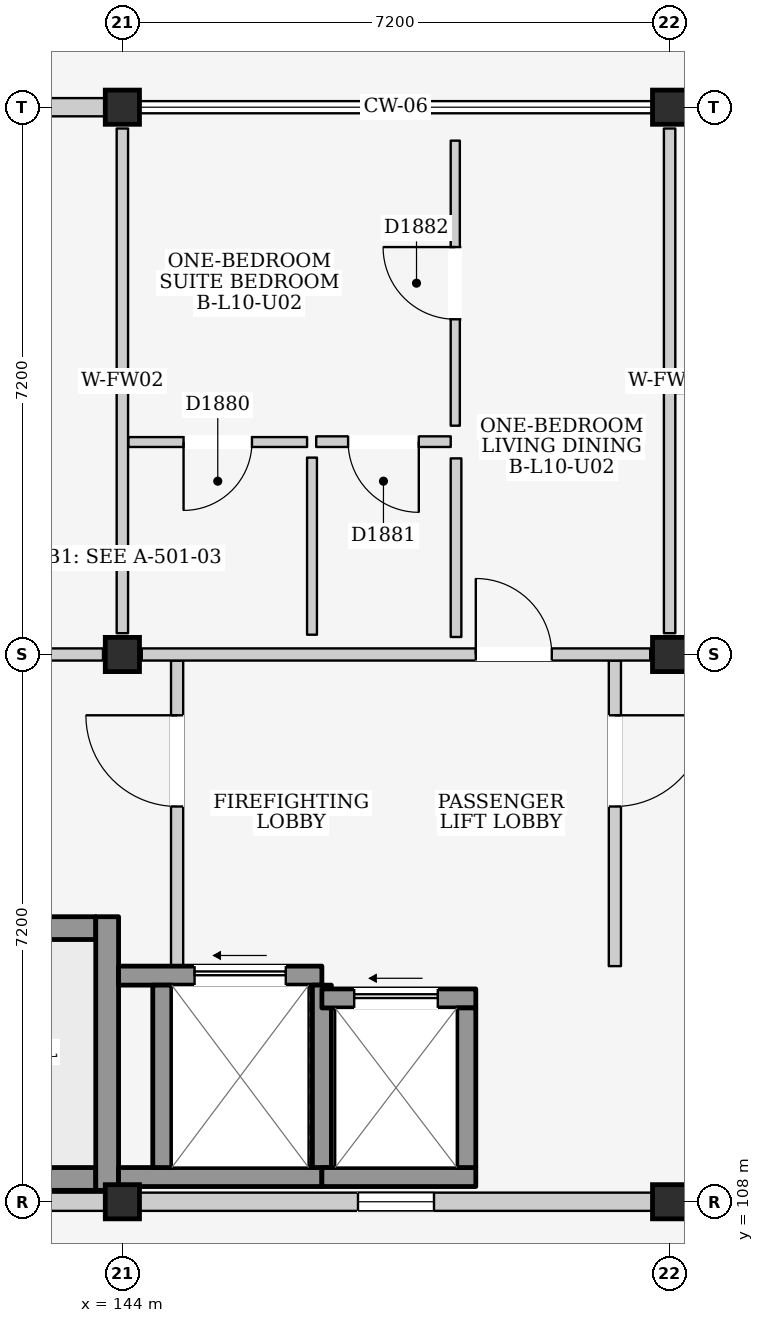
"""IFC4 building model, lengths in metres.
Left out: names, types, materials, properties, quantities, classifications, styles, units other than length and angle.
Written with IfcOpenShell. Run it as: python <this file> out.ifc"""

import sys

from ifc_helpers import new_model, si_unit, direction, frame, frame_2d, origin, origin_2d, place, context, subcontext, project, spatial, rectangle, extrude, element, fill, save


model = new_model("IFC4")
c1 = context("Model", 3, precision=1e-05, world=origin(), true_north=direction((0.0, 1.0)))
c2 = subcontext(c1, "Body", "Model", "MODEL_VIEW")
j1 = project(units=[si_unit("LENGTHUNIT", "METRE"), si_unit("PLANEANGLEUNIT", "RADIAN")], contexts=[c1])
p1 = place(None, origin())
s1 = spatial("IfcSite", under=j1, at=p1, CompositionType="ELEMENT")
p2 = place(p1, origin())
s2 = spatial("IfcBuilding", under=s1, at=p2, CompositionType="ELEMENT")
p3 = place(p2, frame((0.0, 0.0, 34.8)))
s3 = spatial("IfcBuildingStorey", under=s2, at=p3, CompositionType="ELEMENT", Elevation=34.8)
for number, where, z_axis, x_axis in (
    (1, (144.0, 108.0, 0.0), (0.0, 0.0, 1.0), (1.0, 0.0, 0.0)),
    (2, (144.0, 115.2, 0.0), (0.0, 0.0, 1.0), (1.0, 0.0, 0.0)),
    (3, (144.0, 122.4, 0.0), (0.0, 0.0, 1.0), (1.0, 0.0, 0.0)),
    (4, (151.2, 108.0, 0.0), (0.0, 0.0, 1.0), (1.0, 0.0, 0.0)),
    (5, (151.2, 115.2, 0.0), (0.0, 0.0, 1.0), (1.0, 0.0, 0.0)),
    (6, (151.2, 122.4, 0.0), (0.0, 0.0, 1.0), (1.0, 0.0, 0.0)),
):
    element("IfcColumn", number, at=place(p3, frame(where, z_axis=z_axis, x_axis=x_axis)), inside=s3, PredefinedType="COLUMN", context=c2, shape_type="SweptSolid", body=[
        extrude(rectangle(XDim=0.45, YDim=0.45, at=origin_2d()), origin(), (0.0, 0.0, 1.0), 3.2),
    ])
p4 = place(p3, frame((137.025, 108.0, 0.0), z_axis=(0.0, 0.0, 1.0), x_axis=(1.0, 0.0, 0.0)))
e7 = element("IfcWall", 7, at=p4, inside=s3, PredefinedType="ELEMENTEDWALL", context=c2, shape_type="SweptSolid", body=[
    extrude(rectangle(XDim=6.75, YDim=0.24, at=frame_2d((3.375, 0.0))), origin(), (0.0, 0.0, 1.0), 2.345),
])
p5 = place(p4, frame((2.875, 0.0, 1.2)))
e8 = element("IfcOpeningElement", 8, at=p5, cuts=e7, PredefinedType="OPENING", context=c2, shape_type="SweptSolid", body=[
    extrude(rectangle(XDim=1.0, YDim=0.9, at=frame_2d((0.5, 0.45))), frame((0.0, 0.135, 0.0), z_axis=(0.0, -1.0, 0.0), x_axis=(1.0, 0.0, 0.0)), (0.0, 0.0, 1.0), 0.27),
])
p6 = place(p3, frame((137.025, 122.4, 0.0), z_axis=(0.0, 0.0, 1.0), x_axis=(1.0, 0.0, 0.0)))
e9 = element("IfcWall", 9, at=p6, inside=s3, PredefinedType="ELEMENTEDWALL", context=c2, shape_type="SweptSolid", body=[
    extrude(rectangle(XDim=6.75, YDim=0.24, at=frame_2d((3.375, 0.0))), origin(), (0.0, 0.0, 1.0), 2.495),
])
p7 = place(p6, frame((3.85, 0.0, 0.0)))
e10 = element("IfcOpeningElement", 10, at=p7, cuts=e9, PredefinedType="OPENING", context=c2, shape_type="SweptSolid", body=[
    extrude(rectangle(XDim=1.8, YDim=2.12, at=frame_2d((0.9, 1.06))), frame((0.0, 0.135, 0.0), z_axis=(0.0, -1.0, 0.0), x_axis=(1.0, 0.0, 0.0)), (0.0, 0.0, 1.0), 0.27),
])
p8 = place(p6, frame((0.55, 0.0, 0.835)))
e11 = element("IfcOpeningElement", 11, at=p8, cuts=e9, PredefinedType="OPENING", context=c2, shape_type="SweptSolid", body=[
    extrude(rectangle(XDim=1.95, YDim=1.55, at=frame_2d((0.975, 0.775))), frame((0.0, 0.135, 0.0), z_axis=(0.0, -1.0, 0.0), x_axis=(1.0, 0.0, 0.0)), (0.0, 0.0, 1.0), 0.27),
])
p9 = place(p3, frame((144.225, 108.0, 0.0), z_axis=(0.0, 0.0, 1.0), x_axis=(1.0, 0.0, 0.0)))
e12 = element("IfcWall", 12, at=p9, inside=s3, PredefinedType="ELEMENTEDWALL", context=c2, shape_type="SweptSolid", body=[
    extrude(rectangle(XDim=6.75, YDim=0.24, at=frame_2d((3.375, 0.0))), origin(), (0.0, 0.0, 1.0), 2.345),
])
p10 = place(p9, frame((2.875, 0.0, 1.2)))
e13 = element("IfcOpeningElement", 13, at=p10, cuts=e12, PredefinedType="OPENING", context=c2, shape_type="SweptSolid", body=[
    extrude(rectangle(XDim=1.0, YDim=0.9, at=frame_2d((0.5, 0.45))), frame((0.0, 0.135, 0.0), z_axis=(0.0, -1.0, 0.0), x_axis=(1.0, 0.0, 0.0)), (0.0, 0.0, 1.0), 0.27),
])
p11 = place(p3, frame((137.15, 108.3, 0.0), z_axis=(0.0, 0.0, 1.0), x_axis=(1.0, 0.0, 0.0)))
e14 = element("IfcWall", 14, at=p11, inside=s3, PredefinedType="SHEAR", context=c2, shape_type="SweptSolid", body=[
    extrude(rectangle(XDim=6.5, YDim=0.3, at=frame_2d((3.25, 0.0))), origin(), (0.0, 0.0, 1.0), 2.96),
])
p12 = place(p3, frame((137.15, 111.6, 0.0), z_axis=(0.0, 0.0, 1.0), x_axis=(1.0, 0.0, 0.0)))
e15 = element("IfcWall", 15, at=p12, inside=s3, PredefinedType="SHEAR", context=c2, shape_type="SweptSolid", body=[
    extrude(rectangle(XDim=6.5, YDim=0.3, at=frame_2d((3.25, 0.0))), origin(), (0.0, 0.0, 1.0), 2.96),
])
p13 = place(p12, frame((0.18, 0.0, 0.0)))
e16 = element("IfcOpeningElement", 16, at=p13, cuts=e15, PredefinedType="OPENING", context=c2, shape_type="SweptSolid", body=[
    extrude(rectangle(XDim=1.15, YDim=2.2, at=frame_2d((0.575, 1.1))), frame((0.0, 0.165, 0.0), z_axis=(0.0, -1.0, 0.0), x_axis=(1.0, 0.0, 0.0)), (0.0, 0.0, 1.0), 0.33),
])
p14 = place(p3, frame((143.8, 108.15, 0.0), z_axis=(0.0, 0.0, 1.0), x_axis=(0.0, 1.0, 0.0)))
e17 = element("IfcWall", 17, at=p14, inside=s3, PredefinedType="SHEAR", context=c2, shape_type="SweptSolid", body=[
    extrude(rectangle(XDim=3.6, YDim=0.3, at=frame_2d((1.8, 0.0))), origin(), (0.0, 0.0, 1.0), 2.96),
])
p15 = place(p3, frame((144.72, 111.1, 0.0), z_axis=(0.0, 0.0, 1.0), x_axis=(0.0, 1.0, 0.0)))
e18 = element("IfcWall", 18, at=p15, inside=s3, PredefinedType="PARTITIONING", context=c2, shape_type="SweptSolid", body=[
    extrude(rectangle(XDim=4.02, YDim=0.16, at=frame_2d((2.01, 0.0))), origin(), (0.0, 0.0, 1.0), 2.96),
])
p16 = place(p15, frame((2.1, 0.0, 0.0)))
e19 = element("IfcOpeningElement", 19, at=p16, cuts=e18, PredefinedType="OPENING", context=c2, shape_type="SweptSolid", body=[
    extrude(rectangle(XDim=1.2, YDim=2.2, at=frame_2d((0.6, 1.1))), frame((0.0, 0.095, 0.0), z_axis=(0.0, -1.0, 0.0), x_axis=(1.0, 0.0, 0.0)), (0.0, 0.0, 1.0), 0.19),
])
p17 = place(p3, frame((150.48, 111.1, 0.0), z_axis=(0.0, 0.0, 1.0), x_axis=(0.0, 1.0, 0.0)))
e20 = element("IfcWall", 20, at=p17, inside=s3, PredefinedType="PARTITIONING", context=c2, shape_type="SweptSolid", body=[
    extrude(rectangle(XDim=4.02, YDim=0.16, at=frame_2d((2.01, 0.0))), origin(), (0.0, 0.0, 1.0), 2.96),
])
p18 = place(p17, frame((2.1, 0.0, 0.0)))
e21 = element("IfcOpeningElement", 21, at=p18, cuts=e20, PredefinedType="OPENING", context=c2, shape_type="SweptSolid", body=[
    extrude(rectangle(XDim=1.2, YDim=2.2, at=frame_2d((0.6, 1.1))), frame((0.0, 0.095, 0.0), z_axis=(0.0, -1.0, 0.0), x_axis=(1.0, 0.0, 0.0)), (0.0, 0.0, 1.0), 0.19),
])
p19 = place(p3, frame((143.95, 108.325, 0.0), z_axis=(0.0, 0.0, 1.0), x_axis=(1.0, 0.0, 0.0)))
e22 = element("IfcWall", 22, at=p19, inside=s3, PredefinedType="SHEAR", context=c2, shape_type="SweptSolid", body=[
    extrude(rectangle(XDim=2.675, YDim=0.25, at=frame_2d((1.337, 0.0))), origin(), (0.0, 0.0, 1.0), 2.96),
])
p20 = place(p3, frame((143.95, 110.975, 0.0), z_axis=(0.0, 0.0, 1.0), x_axis=(1.0, 0.0, 0.0)))
e23 = element("IfcWall", 23, at=p20, inside=s3, PredefinedType="SHEAR", context=c2, shape_type="SweptSolid", body=[
    extrude(rectangle(XDim=2.675, YDim=0.25, at=frame_2d((1.337, 0.0))), origin(), (0.0, 0.0, 1.0), 2.96),
])
p21 = place(p20, frame((1.0, 0.0, 0.0)))
e24 = element("IfcOpeningElement", 24, at=p21, cuts=e23, PredefinedType="OPENING", context=c2, shape_type="SweptSolid", body=[
    extrude(rectangle(XDim=1.2, YDim=2.25, at=frame_2d((0.6, 1.125))), frame((0.0, 0.14, 0.0), z_axis=(0.0, -1.0, 0.0), x_axis=(1.0, 0.0, 0.0)), (0.0, 0.0, 1.0), 0.28),
])
for number, where, z_axis, x_axis in (
    (25, (144.525, 108.45, 0.0), (0.0, 0.0, 1.0), (0.0, 1.0, 0.0)),
    (26, (146.625, 108.45, 0.0), (0.0, 0.0, 1.0), (0.0, 1.0, 0.0)),
):
    element("IfcWall", number, at=place(p3, frame(where, z_axis=z_axis, x_axis=x_axis)), inside=s3, PredefinedType="SHEAR", context=c2, shape_type="SweptSolid", body=[
        extrude(rectangle(XDim=2.4, YDim=0.25, at=frame_2d((1.2, 0.0))), origin(), (0.0, 0.0, 1.0), 2.96),
    ])
p22 = place(p3, frame((146.625, 108.325, 0.0), z_axis=(0.0, 0.0, 1.0), x_axis=(1.0, 0.0, 0.0)))
e27 = element("IfcWall", 27, at=p22, inside=s3, PredefinedType="SHEAR", context=c2, shape_type="SweptSolid", body=[
    extrude(rectangle(XDim=2.025, YDim=0.25, at=frame_2d((1.012, 0.0))), origin(), (0.0, 0.0, 1.0), 2.96),
])
p23 = place(p3, frame((146.625, 110.675, 0.0), z_axis=(0.0, 0.0, 1.0), x_axis=(1.0, 0.0, 0.0)))
e28 = element("IfcWall", 28, at=p23, inside=s3, PredefinedType="SHEAR", context=c2, shape_type="SweptSolid", body=[
    extrude(rectangle(XDim=2.025, YDim=0.25, at=frame_2d((1.012, 0.0))), origin(), (0.0, 0.0, 1.0), 2.96),
])
p24 = place(p23, frame((0.425, 0.0, 0.0)))
e29 = element("IfcOpeningElement", 29, at=p24, cuts=e28, PredefinedType="OPENING", context=c2, shape_type="SweptSolid", body=[
    extrude(rectangle(XDim=1.1, YDim=2.15, at=frame_2d((0.55, 1.075))), frame((0.0, 0.14, 0.0), z_axis=(0.0, -1.0, 0.0), x_axis=(1.0, 0.0, 0.0)), (0.0, 0.0, 1.0), 0.28),
])
p25 = place(p3, frame((148.525, 108.45, 0.0), z_axis=(0.0, 0.0, 1.0), x_axis=(0.0, 1.0, 0.0)))
e30 = element("IfcWall", 30, at=p25, inside=s3, PredefinedType="SHEAR", context=c2, shape_type="SweptSolid", body=[
    extrude(rectangle(XDim=2.1, YDim=0.25, at=frame_2d((1.05, 0.0))), origin(), (0.0, 0.0, 1.0), 2.96),
])
p26 = place(p3, frame((137.08, 115.2, 0.0), z_axis=(0.0, 0.0, 1.0), x_axis=(1.0, 0.0, 0.0)))
e31 = element("IfcWall", 31, at=p26, inside=s3, PredefinedType="PARTITIONING", context=c2, shape_type="SweptSolid", body=[
    extrude(rectangle(XDim=6.665, YDim=0.16, at=frame_2d((3.333, 0.0))), origin(), (0.0, 0.0, 1.0), 2.345),
])
p27 = place(p26, frame((4.145, 0.0, 0.0)))
e32 = element("IfcOpeningElement", 32, at=p27, cuts=e31, PredefinedType="OPENING", context=c2, shape_type="SweptSolid", body=[
    extrude(rectangle(XDim=1.05, YDim=2.2, at=frame_2d((0.525, 1.1))), frame((0.0, 0.095, 0.0), z_axis=(0.0, -1.0, 0.0), x_axis=(1.0, 0.0, 0.0)), (0.0, 0.0, 1.0), 0.19),
])
p28 = place(p3, frame((144.0, 115.48, 0.0), z_axis=(0.0, 0.0, 1.0), x_axis=(0.0, 1.0, 0.0)))
e33 = element("IfcWall", 33, at=p28, inside=s3, PredefinedType="PARTITIONING", context=c2, shape_type="SweptSolid", body=[
    extrude(rectangle(XDim=6.64, YDim=0.15, at=frame_2d((3.32, 0.0))), origin(), (0.0, 0.0, 1.0), 2.445),
])
p29 = place(p3, frame((144.255, 115.2, 0.0), z_axis=(0.0, 0.0, 1.0), x_axis=(1.0, 0.0, 0.0)))
e34 = element("IfcWall", 34, at=p29, inside=s3, PredefinedType="PARTITIONING", context=c2, shape_type="SweptSolid", body=[
    extrude(rectangle(XDim=6.69, YDim=0.16, at=frame_2d((3.345, 0.0))), origin(), (0.0, 0.0, 1.0), 2.345),
])
p30 = place(p29, frame((4.395, 0.0, 0.0)))
e35 = element("IfcOpeningElement", 35, at=p30, cuts=e34, PredefinedType="OPENING", context=c2, shape_type="SweptSolid", body=[
    extrude(rectangle(XDim=1.0, YDim=2.15, at=frame_2d((0.5, 1.075))), frame((0.0, 0.095, 0.0), z_axis=(0.0, -1.0, 0.0), x_axis=(1.0, 0.0, 0.0)), (0.0, 0.0, 1.0), 0.19),
])
p31 = place(p3, frame((151.2, 115.48, 0.0), z_axis=(0.0, 0.0, 1.0), x_axis=(0.0, 1.0, 0.0)))
e36 = element("IfcWall", 36, at=p31, inside=s3, PredefinedType="PARTITIONING", context=c2, shape_type="SweptSolid", body=[
    extrude(rectangle(XDim=6.64, YDim=0.15, at=frame_2d((3.32, 0.0))), origin(), (0.0, 0.0, 1.0), 2.445),
])
p32 = place(p3, frame((144.08, 117.995, 0.0), z_axis=(0.0, 0.0, 1.0), x_axis=(1.0, 0.0, 0.0)))
e37 = element("IfcWall", 37, at=p32, inside=s3, PredefinedType="PARTITIONING", context=c2, shape_type="SweptSolid", body=[
    extrude(rectangle(XDim=2.35, YDim=0.13, at=frame_2d((1.175, 0.0))), origin(), (0.0, 0.0, 1.0), 2.96),
])
p33 = place(p32, frame((0.725, 0.0, 0.0)))
e38 = element("IfcOpeningElement", 38, at=p33, cuts=e37, PredefinedType="OPENING", context=c2, shape_type="SweptSolid", body=[
    extrude(rectangle(XDim=0.9, YDim=2.1, at=frame_2d((0.45, 1.05))), frame((0.0, 0.08, 0.0), z_axis=(0.0, -1.0, 0.0), x_axis=(1.0, 0.0, 0.0)), (0.0, 0.0, 1.0), 0.16),
])
p34 = place(p3, frame((146.495, 115.46, 0.0), z_axis=(0.0, 0.0, 1.0), x_axis=(0.0, 1.0, 0.0)))
e39 = element("IfcWall", 39, at=p34, inside=s3, PredefinedType="PARTITIONING", context=c2, shape_type="SweptSolid", body=[
    extrude(rectangle(XDim=2.33, YDim=0.13, at=frame_2d((1.165, 0.0))), origin(), (0.0, 0.0, 1.0), 2.96),
])
p35 = place(p3, frame((146.55, 118.0, 0.0), z_axis=(0.0, 0.0, 1.0), x_axis=(1.0, 0.0, 0.0)))
e40 = element("IfcWall", 40, at=p35, inside=s3, PredefinedType="PARTITIONING", context=c2, shape_type="SweptSolid", body=[
    extrude(rectangle(XDim=1.77, YDim=0.14, at=frame_2d((0.885, 0.0))), origin(), (0.0, 0.0, 1.0), 2.96),
])
p36 = place(p35, frame((0.42, 0.0, 0.0)))
e41 = element("IfcOpeningElement", 41, at=p36, cuts=e40, PredefinedType="OPENING", context=c2, shape_type="SweptSolid", body=[
    extrude(rectangle(XDim=0.93, YDim=2.14, at=frame_2d((0.465, 1.07))), frame((0.0, 0.085, 0.0), z_axis=(0.0, -1.0, 0.0), x_axis=(1.0, 0.0, 0.0)), (0.0, 0.0, 1.0), 0.17),
])
p37 = place(p3, frame((148.39, 115.43, 0.0), z_axis=(0.0, 0.0, 1.0), x_axis=(0.0, 1.0, 0.0)))
e42 = element("IfcWall", 42, at=p37, inside=s3, PredefinedType="PARTITIONING", context=c2, shape_type="SweptSolid", body=[
    extrude(rectangle(XDim=2.35, YDim=0.14, at=frame_2d((1.175, 0.0))), origin(), (0.0, 0.0, 1.0), 2.96),
])
p38 = place(p3, frame((148.38, 118.21, 0.0), z_axis=(0.0, 0.0, 1.0), x_axis=(0.0, 1.0, 0.0)))
e43 = element("IfcWall", 43, at=p38, inside=s3, PredefinedType="PARTITIONING", context=c2, shape_type="SweptSolid", body=[
    extrude(rectangle(XDim=3.75, YDim=0.12, at=frame_2d((1.875, 0.0))), origin(), (0.0, 0.0, 1.0), 2.96),
])
p39 = place(p38, frame((1.4, 0.0, 0.0)))
e44 = element("IfcOpeningElement", 44, at=p39, cuts=e43, PredefinedType="OPENING", context=c2, shape_type="SweptSolid", body=[
    extrude(rectangle(XDim=0.95, YDim=2.15, at=frame_2d((0.475, 1.075))), frame((0.0, 0.075, 0.0), z_axis=(0.0, -1.0, 0.0), x_axis=(1.0, 0.0, 0.0)), (0.0, 0.0, 1.0), 0.15),
])
p40 = place(p3, frame((151.28, 118.705, 0.0), z_axis=(0.0, 0.0, 1.0), x_axis=(1.0, 0.0, 0.0)))
e45 = element("IfcWall", 45, at=p40, inside=s3, PredefinedType="PARTITIONING", context=c2, shape_type="SweptSolid", body=[
    extrude(rectangle(XDim=2.4, YDim=0.13, at=frame_2d((1.2, 0.0))), origin(), (0.0, 0.0, 1.0), 2.96),
])
p41 = place(p40, frame((0.75, 0.0, 0.0)))
e46 = element("IfcOpeningElement", 46, at=p41, cuts=e45, PredefinedType="OPENING", context=c2, shape_type="SweptSolid", body=[
    extrude(rectangle(XDim=0.9, YDim=2.1, at=frame_2d((0.45, 1.05))), frame((0.0, 0.08, 0.0), z_axis=(0.0, -1.0, 0.0), x_axis=(1.0, 0.0, 0.0)), (0.0, 0.0, 1.0), 0.16),
])
p42 = place(p10, origin())
e47 = element("IfcWindow", 47, at=p42, inside=s3, PartitioningType="SINGLE_PANEL", PredefinedType="WINDOW", context=c2, shape_type="SweptSolid", body=[
    extrude(rectangle(XDim=1.0, YDim=0.9, at=frame_2d((0.5, 0.45))), frame((0.0, 0.03, 0.0), z_axis=(0.0, -1.0, 0.0), x_axis=(1.0, 0.0, 0.0)), (0.0, 0.0, 1.0), 0.06),
])
fill(e13, e47)
p43 = place(p16, origin())
e48 = element("IfcDoor", 48, at=p43, inside=s3, OperationType="SINGLE_SWING_RIGHT", PredefinedType="DOOR", context=c2, shape_type="SweptSolid", body=[
    extrude(rectangle(XDim=1.2, YDim=2.2, at=frame_2d((0.6, 1.1))), frame((0.0, 0.025, 0.0), z_axis=(0.0, -1.0, 0.0), x_axis=(1.0, 0.0, 0.0)), (0.0, 0.0, 1.0), 0.05),
])
fill(e19, e48)
p44 = place(p18, frame((1.2, 0.0, 0.0), z_axis=(0.0, 0.0, 1.0), x_axis=(-1.0, 0.0, 0.0)))
e49 = element("IfcDoor", 49, at=p44, inside=s3, OperationType="SINGLE_SWING_LEFT", PredefinedType="DOOR", context=c2, shape_type="SweptSolid", body=[
    extrude(rectangle(XDim=1.2, YDim=2.2, at=frame_2d((0.6, 1.1))), frame((0.0, 0.025, 0.0), z_axis=(0.0, -1.0, 0.0), x_axis=(1.0, 0.0, 0.0)), (0.0, 0.0, 1.0), 0.05),
])
fill(e21, e49)
p45 = place(p21, origin())
e50 = element("IfcDoor", 50, at=p45, inside=s3, OperationType="SLIDING_TO_LEFT", PredefinedType="DOOR", context=c2, shape_type="SweptSolid", body=[
    extrude(rectangle(XDim=1.2, YDim=2.25, at=frame_2d((0.6, 1.125))), frame((0.0, 0.025, 0.0), z_axis=(0.0, -1.0, 0.0), x_axis=(1.0, 0.0, 0.0)), (0.0, 0.0, 1.0), 0.05),
])
fill(e24, e50)
p46 = place(p24, origin())
e51 = element("IfcDoor", 51, at=p46, inside=s3, OperationType="SLIDING_TO_LEFT", PredefinedType="DOOR", context=c2, shape_type="SweptSolid", body=[
    extrude(rectangle(XDim=1.1, YDim=2.15, at=frame_2d((0.55, 1.075))), frame((0.0, 0.025, 0.0), z_axis=(0.0, -1.0, 0.0), x_axis=(1.0, 0.0, 0.0)), (0.0, 0.0, 1.0), 0.05),
])
fill(e29, e51)
p47 = place(p30, origin())
e52 = element("IfcDoor", 52, at=p47, inside=s3, OperationType="SINGLE_SWING_LEFT", PredefinedType="DOOR", context=c2, shape_type="SweptSolid", body=[
    extrude(rectangle(XDim=1.0, YDim=2.15, at=frame_2d((0.5, 1.075))), frame((0.0, 0.025, 0.0), z_axis=(0.0, -1.0, 0.0), x_axis=(1.0, 0.0, 0.0)), (0.0, 0.0, 1.0), 0.05),
])
fill(e35, e52)
p48 = place(p33, frame((0.9, 0.0, 0.0), z_axis=(0.0, 0.0, 1.0), x_axis=(-1.0, 0.0, 0.0)))
e53 = element("IfcDoor", 53, at=p48, inside=s3, OperationType="SINGLE_SWING_RIGHT", PredefinedType="DOOR", context=c2, shape_type="SweptSolid", body=[
    extrude(rectangle(XDim=0.9, YDim=2.1, at=frame_2d((0.45, 1.05))), frame((0.0, 0.025, 0.0), z_axis=(0.0, -1.0, 0.0), x_axis=(1.0, 0.0, 0.0)), (0.0, 0.0, 1.0), 0.05),
])
fill(e38, e53)
p49 = place(p36, frame((0.93, 0.0, 0.0), z_axis=(0.0, 0.0, 1.0), x_axis=(-1.0, 0.0, 0.0)))
e54 = element("IfcDoor", 54, at=p49, inside=s3, OperationType="SINGLE_SWING_LEFT", PredefinedType="DOOR", context=c2, shape_type="SweptSolid", body=[
    extrude(rectangle(XDim=0.93, YDim=2.14, at=frame_2d((0.465, 1.07))), frame((0.0, 0.025, 0.0), z_axis=(0.0, -1.0, 0.0), x_axis=(1.0, 0.0, 0.0)), (0.0, 0.0, 1.0), 0.05),
])
fill(e41, e54)
p50 = place(p39, origin())
e55 = element("IfcDoor", 55, at=p50, inside=s3, OperationType="SINGLE_SWING_RIGHT", PredefinedType="DOOR", context=c2, shape_type="SweptSolid", body=[
    extrude(rectangle(XDim=0.95, YDim=2.15, at=frame_2d((0.475, 1.075))), frame((0.0, 0.025, 0.0), z_axis=(0.0, -1.0, 0.0), x_axis=(1.0, 0.0, 0.0)), (0.0, 0.0, 1.0), 0.05),
])
fill(e44, e55)
save(model, sys.argv[1])
